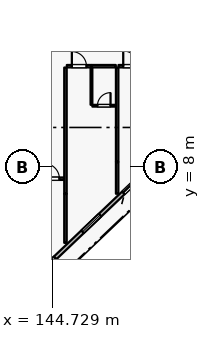
"""IFC4 building model, lengths in metres.
Left out: names, types, materials, properties, quantities, classifications, styles, units other than length and angle.
Written with IfcOpenShell. Run it as: python <this file> out.ifc"""

import sys

from ifc_helpers import new_model, si_unit, direction, frame, frame_2d, origin, place, context, subcontext, project, spatial, rectangle, extrude, element, fill, save


model = new_model("IFC4")
c1 = context("Model", 3, precision=1e-05, world=origin(), true_north=direction((0.0, 1.0)))
c2 = subcontext(c1, "Body", "Model", "MODEL_VIEW")
j1 = project(units=[si_unit("LENGTHUNIT", "METRE"), si_unit("PLANEANGLEUNIT", "RADIAN")], contexts=[c1])
p1 = place(None, origin())
s1 = spatial("IfcSite", under=j1, at=p1, CompositionType="ELEMENT")
p2 = place(p1, origin())
s2 = spatial("IfcBuilding", under=s1, at=p2, CompositionType="ELEMENT")
p3 = place(p2, frame((0.0, 0.0, 21.0)))
s3 = spatial("IfcBuildingStorey", under=s2, at=p3, CompositionType="ELEMENT", Elevation=21.0)
p4 = place(p3, frame((150.8, 7.619, 0.0), z_axis=(0.0, 0.0, 1.0), x_axis=(-0.724156739794, -0.689635422677, 0.0)))
e1 = element("IfcWall", 1, at=p4, inside=s3, PredefinedType="SOLIDWALL", context=c2, shape_type="SweptSolid", body=[
    extrude(rectangle(XDim=10.495, YDim=0.24, at=frame_2d((5.248, 0.0))), origin(), (0.0, 0.0, 1.0), 3.53),
])
p5 = place(p4, frame((0.424, 0.0, 0.0)))
e2 = element("IfcOpeningElement", 2, at=p5, cuts=e1, PredefinedType="OPENING", context=c2, shape_type="SweptSolid", body=[
    extrude(rectangle(XDim=1.5, YDim=2.25, at=frame_2d((0.75, 1.125))), frame((0.0, 0.13, 0.0), z_axis=(0.0, -1.0, 0.0), x_axis=(1.0, 0.0, 0.0)), (0.0, 0.0, 1.0), 0.26),
])
p6 = place(p4, frame((4.033, 0.0, 0.8)))
e3 = element("IfcOpeningElement", 3, at=p6, cuts=e1, PredefinedType="OPENING", context=c2, shape_type="SweptSolid", body=[
    extrude(rectangle(XDim=1.6, YDim=1.6, at=frame_2d((0.8, 0.8))), frame((0.0, 0.13, 0.0), z_axis=(0.0, -1.0, 0.0), x_axis=(1.0, 0.0, 0.0)), (0.0, 0.0, 1.0), 0.26),
])
p7 = place(p4, frame((8.107, 0.0, 0.8)))
e4 = element("IfcOpeningElement", 4, at=p7, cuts=e1, PredefinedType="OPENING", context=c2, shape_type="SweptSolid", body=[
    extrude(rectangle(XDim=1.6, YDim=1.6, at=frame_2d((0.8, 0.8))), frame((0.0, 0.13, 0.0), z_axis=(0.0, -1.0, 0.0), x_axis=(1.0, 0.0, 0.0)), (0.0, 0.0, 1.0), 0.26),
])
p8 = place(p3, frame((143.89, 7.23, 0.0), z_axis=(0.0, 0.0, 1.0), x_axis=(1.0, 0.0, 0.0)))
e5 = element("IfcWall", 5, at=p8, inside=s3, PredefinedType="PARTITIONING", context=c2, shape_type="SweptSolid", body=[
    extrude(rectangle(XDim=1.62, YDim=0.16, at=frame_2d((0.81, 0.0))), origin(), (0.0, 0.0, 1.0), 3.965),
])
p9 = place(p8, frame((0.31, 0.0, 0.0)))
e6 = element("IfcOpeningElement", 6, at=p9, cuts=e5, PredefinedType="OPENING", context=c2, shape_type="SweptSolid", body=[
    extrude(rectangle(XDim=1.0, YDim=2.25, at=frame_2d((0.5, 1.125))), frame((0.0, 0.09, 0.0), z_axis=(0.0, -1.0, 0.0), x_axis=(1.0, 0.0, 0.0)), (0.0, 0.0, 1.0), 0.18),
])
p10 = place(p3, frame((145.6, 3.01, 0.0), z_axis=(0.0, 0.0, 1.0), x_axis=(0.0, 1.0, 0.0)))
e7 = element("IfcWall", 7, at=p10, inside=s3, PredefinedType="PARTITIONING", context=c2, shape_type="SweptSolid", body=[
    extrude(rectangle(XDim=3.22, YDim=0.16, at=frame_2d((1.61, 0.0))), origin(), (0.0, 0.0, 1.0), 3.965),
])
p11 = place(p3, frame((145.69, 14.63, 0.0), z_axis=(0.0, 0.0, 1.0), x_axis=(1.0, 0.0, 0.0)))
e8 = element("IfcWall", 8, at=p11, inside=s3, PredefinedType="PARTITIONING", context=c2, shape_type="SweptSolid", body=[
    extrude(rectangle(XDim=1.62, YDim=0.16, at=frame_2d((0.81, 0.0))), origin(), (0.0, 0.0, 1.0), 3.965),
])
p12 = place(p11, frame((0.33, 0.0, 0.0)))
e9 = element("IfcOpeningElement", 9, at=p12, cuts=e8, PredefinedType="OPENING", context=c2, shape_type="SweptSolid", body=[
    extrude(rectangle(XDim=0.96, YDim=2.2, at=frame_2d((0.48, 1.1))), frame((0.0, 0.09, 0.0), z_axis=(0.0, -1.0, 0.0), x_axis=(1.0, 0.0, 0.0)), (0.0, 0.0, 1.0), 0.18),
])
p13 = place(p3, frame((147.32, 14.63, 0.0), z_axis=(0.0, 0.0, 1.0), x_axis=(1.0, 0.0, 0.0)))
e10 = element("IfcWall", 10, at=p13, inside=s3, PredefinedType="PARTITIONING", context=c2, shape_type="SweptSolid", body=[
    extrude(rectangle(XDim=1.59, YDim=0.16, at=frame_2d((0.795, 0.0))), origin(), (0.0, 0.0, 1.0), 3.965),
])
p14 = place(p3, frame((147.31, 12.09, 0.0), z_axis=(0.0, 0.0, 1.0), x_axis=(0.0, 1.0, 0.0)))
e11 = element("IfcWall", 11, at=p14, inside=s3, PredefinedType="PARTITIONING", context=c2, shape_type="SweptSolid", body=[
    extrude(rectangle(XDim=2.45, YDim=0.115, at=frame_2d((1.225, 0.0))), origin(), (0.0, 0.0, 1.0), 3.965),
])
p15 = place(p3, frame((147.37, 12.03, 0.0), z_axis=(0.0, 0.0, 1.0), x_axis=(1.0, 0.0, 0.0)))
e12 = element("IfcWall", 12, at=p15, inside=s3, PredefinedType="PARTITIONING", context=c2, shape_type="SweptSolid", body=[
    extrude(rectangle(XDim=1.53, YDim=0.115, at=frame_2d((0.765, 0.0))), origin(), (0.0, 0.0, 1.0), 3.965),
])
p16 = place(p15, frame((0.335, 0.0, 0.0)))
e13 = element("IfcOpeningElement", 13, at=p16, cuts=e12, PredefinedType="OPENING", context=c2, shape_type="SweptSolid", body=[
    extrude(rectangle(XDim=0.86, YDim=2.12, at=frame_2d((0.43, 1.06))), frame((0.0, 0.067, 0.0), z_axis=(0.0, -1.0, 0.0), x_axis=(1.0, 0.0, 0.0)), (0.0, 0.0, 1.0), 0.135),
])
p17 = place(p3, frame((145.6, 6.24, 0.0), z_axis=(0.0, 0.0, 1.0), x_axis=(0.0, 1.0, 0.0)))
e14 = element("IfcWall", 14, at=p17, inside=s3, PredefinedType="PARTITIONING", context=c2, shape_type="SweptSolid", body=[
    extrude(rectangle(XDim=8.3, YDim=0.16, at=frame_2d((4.15, 0.0))), origin(), (0.0, 0.0, 1.0), 3.965),
])
p18 = place(p3, frame((149.0, 6.24, 0.0), z_axis=(0.0, 0.0, 1.0), x_axis=(0.0, 1.0, 0.0)))
e15 = element("IfcWall", 15, at=p18, inside=s3, PredefinedType="PARTITIONING", context=c2, shape_type="SweptSolid", body=[
    extrude(rectangle(XDim=2.09, YDim=0.16, at=frame_2d((1.045, 0.0))), origin(), (0.0, 0.0, 1.0), 3.965),
])
p19 = place(p3, frame((149.09, 14.63, 0.0), z_axis=(0.0, 0.0, 1.0), x_axis=(1.0, 0.0, 0.0)))
e16 = element("IfcWall", 16, at=p19, inside=s3, PredefinedType="PARTITIONING", context=c2, shape_type="SweptSolid", body=[
    extrude(rectangle(XDim=1.62, YDim=0.16, at=frame_2d((0.81, 0.0))), origin(), (0.0, 0.0, 1.0), 3.965),
])
p20 = place(p19, frame((0.31, 0.0, 0.0)))
e17 = element("IfcOpeningElement", 17, at=p20, cuts=e16, PredefinedType="OPENING", context=c2, shape_type="SweptSolid", body=[
    extrude(rectangle(XDim=1.0, YDim=2.25, at=frame_2d((0.5, 1.125))), frame((0.0, 0.09, 0.0), z_axis=(0.0, -1.0, 0.0), x_axis=(1.0, 0.0, 0.0)), (0.0, 0.0, 1.0), 0.18),
])
p21 = place(p3, frame((149.0, 8.34, 0.0), z_axis=(0.0, 0.0, 1.0), x_axis=(0.0, 1.0, 0.0)))
e18 = element("IfcWall", 18, at=p21, inside=s3, PredefinedType="PARTITIONING", context=c2, shape_type="SweptSolid", body=[
    extrude(rectangle(XDim=6.2, YDim=0.16, at=frame_2d((3.1, 0.0))), origin(), (0.0, 0.0, 1.0), 3.965),
])
p22 = place(p5, origin())
e19 = element("IfcDoor", 19, at=p22, inside=s3, OperationType="SLIDING_TO_LEFT", PredefinedType="DOOR", context=c2, shape_type="SweptSolid", body=[
    extrude(rectangle(XDim=1.5, YDim=2.25, at=frame_2d((0.75, 1.125))), frame((0.0, 0.025, 0.0), z_axis=(0.0, -1.0, 0.0), x_axis=(1.0, 0.0, 0.0)), (0.0, 0.0, 1.0), 0.05),
])
fill(e2, e19)
p23 = place(p6, origin())
e20 = element("IfcWindow", 20, at=p23, inside=s3, PartitioningType="SINGLE_PANEL", PredefinedType="WINDOW", context=c2, shape_type="SweptSolid", body=[
    extrude(rectangle(XDim=1.6, YDim=1.6, at=frame_2d((0.8, 0.8))), frame((0.0, 0.03, 0.0), z_axis=(0.0, -1.0, 0.0), x_axis=(1.0, 0.0, 0.0)), (0.0, 0.0, 1.0), 0.06),
])
fill(e3, e20)
p24 = place(p7, origin())
e21 = element("IfcWindow", 21, at=p24, inside=s3, PartitioningType="SINGLE_PANEL", PredefinedType="WINDOW", context=c2, shape_type="SweptSolid", body=[
    extrude(rectangle(XDim=1.6, YDim=1.6, at=frame_2d((0.8, 0.8))), frame((0.0, 0.03, 0.0), z_axis=(0.0, -1.0, 0.0), x_axis=(1.0, 0.0, 0.0)), (0.0, 0.0, 1.0), 0.06),
])
fill(e4, e21)
p25 = place(p9, origin())
e22 = element("IfcDoor", 22, at=p25, inside=s3, OperationType="SINGLE_SWING_LEFT", PredefinedType="DOOR", context=c2, shape_type="SweptSolid", body=[
    extrude(rectangle(XDim=1.0, YDim=2.25, at=frame_2d((0.5, 1.125))), frame((0.0, 0.025, 0.0), z_axis=(0.0, -1.0, 0.0), x_axis=(1.0, 0.0, 0.0)), (0.0, 0.0, 1.0), 0.05),
])
fill(e6, e22)
p26 = place(p12, origin())
e23 = element("IfcDoor", 23, at=p26, inside=s3, OperationType="SINGLE_SWING_LEFT", PredefinedType="DOOR", context=c2, shape_type="SweptSolid", body=[
    extrude(rectangle(XDim=0.96, YDim=2.2, at=frame_2d((0.48, 1.1))), frame((0.0, 0.025, 0.0), z_axis=(0.0, -1.0, 0.0), x_axis=(1.0, 0.0, 0.0)), (0.0, 0.0, 1.0), 0.05),
])
fill(e9, e23)
p27 = place(p16, origin())
e24 = element("IfcDoor", 24, at=p27, inside=s3, OperationType="SINGLE_SWING_RIGHT", PredefinedType="DOOR", context=c2, shape_type="SweptSolid", body=[
    extrude(rectangle(XDim=0.86, YDim=2.12, at=frame_2d((0.43, 1.06))), frame((0.0, 0.025, 0.0), z_axis=(0.0, -1.0, 0.0), x_axis=(1.0, 0.0, 0.0)), (0.0, 0.0, 1.0), 0.05),
])
fill(e13, e24)
p28 = place(p20, origin())
e25 = element("IfcDoor", 25, at=p28, inside=s3, OperationType="SINGLE_SWING_LEFT", PredefinedType="DOOR", context=c2, shape_type="SweptSolid", body=[
    extrude(rectangle(XDim=1.0, YDim=2.25, at=frame_2d((0.5, 1.125))), frame((0.0, 0.025, 0.0), z_axis=(0.0, -1.0, 0.0), x_axis=(1.0, 0.0, 0.0)), (0.0, 0.0, 1.0), 0.05),
])
fill(e17, e25)
save(model, sys.argv[1])
